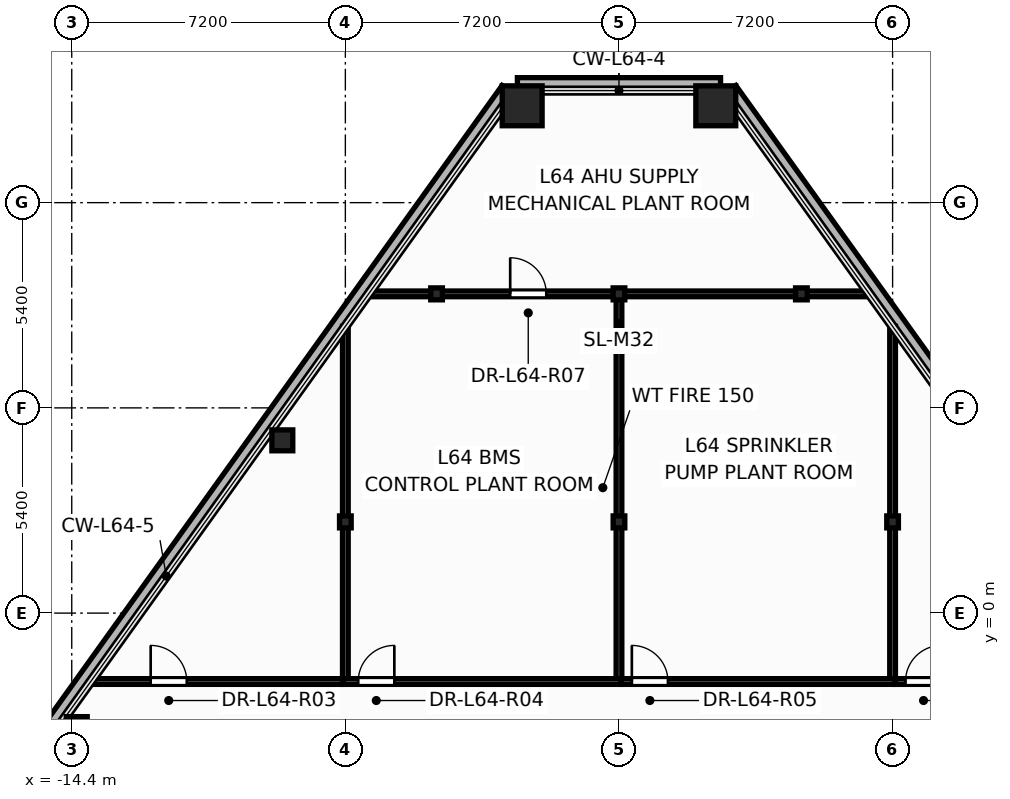
"""IFC4 building model, lengths in metres.
Left out: names, types, materials, properties, quantities, classifications, styles, units other than length and angle.
Written with IfcOpenShell. Run it as: python <this file> out.ifc"""

import sys

from ifc_helpers import new_model, si_unit, direction, frame, frame_2d, origin, origin_2d, place, context, subcontext, project, spatial, rectangle, hollow_rectangle, hollow_circle, i_section, extrude, element, fill, save


model = new_model("IFC4")
c1 = context("Model", 3, precision=1e-05, world=origin(), true_north=direction((0.0, 1.0)))
c2 = subcontext(c1, "Body", "Model", "MODEL_VIEW")
j1 = project(units=[si_unit("LENGTHUNIT", "METRE"), si_unit("PLANEANGLEUNIT", "RADIAN")], contexts=[c1])
p1 = place(None, origin())
s1 = spatial("IfcSite", under=j1, at=p1, CompositionType="ELEMENT")
p2 = place(p1, origin())
s2 = spatial("IfcBuilding", under=s1, at=p2, CompositionType="ELEMENT")
p3 = place(p2, frame((0.0, 0.0, 244.2)))
s3 = spatial("IfcBuildingStorey", under=s2, at=p3, CompositionType="ELEMENT", Elevation=244.2)
for number, where, z_axis, x_axis in (
    (1, (2.548, 13.349, 0.0), (0.0, 0.0, 1.0), (1.0, 0.0, 0.0)),
    (2, (-2.548, 13.349, 0.0), (0.0, 0.0, 1.0), (1.0, 0.0, 0.0)),
):
    element("IfcColumn", number, at=place(p3, frame(where, z_axis=z_axis, x_axis=x_axis)), inside=s3, PredefinedType="COLUMN", context=c2, shape_type="SweptSolid", body=[
        extrude(hollow_rectangle(XDim=1.05, YDim=1.05, WallThickness=0.045, at=origin_2d()), origin(), (0.0, 0.0, 1.0), 4.8),
    ])
for number, where, z_axis, x_axis in (
    (3, (-8.858, 4.546, 0.0), (0.0, 0.0, 1.0), (1.0, 0.0, 0.0)),
    (4, (-14.268, -2.999, 0.0), (0.0, 0.0, 1.0), (1.0, 0.0, 0.0)),
):
    element("IfcColumn", number, at=place(p3, frame(where, z_axis=z_axis, x_axis=x_axis)), inside=s3, PredefinedType="COLUMN", context=c2, shape_type="SweptSolid", body=[
        extrude(hollow_circle(Radius=0.275, WallThickness=0.024, at=origin_2d()), origin(), (0.0, 0.0, 1.0), 4.8),
    ])
for number, where, z_axis, x_axis in (
    (5, (-7.2, 2.4, 0.0), (0.0, 0.0, 1.0), (1.0, 0.0, 0.0)),
    (6, (0.0, 2.4, 0.0), (0.0, 0.0, 1.0), (1.0, 0.0, 0.0)),
    (7, (7.2, 2.4, 0.0), (0.0, 0.0, 1.0), (1.0, 0.0, 0.0)),
    (8, (-4.8, 8.4, 0.0), (0.0, 0.0, 1.0), (1.0, 0.0, 0.0)),
    (9, (0.0, 8.4, 0.0), (0.0, 0.0, 1.0), (1.0, 0.0, 0.0)),
    (10, (4.8, 8.4, 0.0), (0.0, 0.0, 1.0), (1.0, 0.0, 0.0)),
):
    element("IfcColumn", number, at=place(p3, frame(where, z_axis=z_axis, x_axis=x_axis)), inside=s3, PredefinedType="COLUMN", context=c2, shape_type="SweptSolid", body=[
        extrude(i_section(OverallWidth=0.307, OverallDepth=0.314, WebThickness=0.012, FlangeThickness=0.019, at=origin_2d()), origin(), (0.0, 0.0, 1.0), 4.8),
    ])
p4 = place(p3, frame((21.155, -11.644, -0.2), z_axis=(0.0, 0.0, 1.0), x_axis=(-0.582665985036, 0.812711726187, 0.0)))
e11 = element("IfcWall", 11, at=p4, inside=s3, PredefinedType="PARAPET", context=c2, shape_type="SweptSolid", body=[
    extrude(rectangle(XDim=31.279, YDim=0.36, at=frame_2d((15.639, 0.0))), origin(), (0.0, 0.0, 1.0), 0.38),
])
p5 = place(p3, frame((2.673, 13.909, -0.2), z_axis=(0.0, 0.0, 1.0), x_axis=(-1.0, 0.0, 0.0)))
e12 = element("IfcWall", 12, at=p5, inside=s3, PredefinedType="PARAPET", context=c2, shape_type="SweptSolid", body=[
    extrude(rectangle(XDim=5.346, YDim=0.36, at=frame_2d((2.673, 0.0))), origin(), (0.0, 0.0, 1.0), 0.38),
])
p6 = place(p3, frame((-2.929, 13.777, -0.2), z_axis=(0.0, 0.0, 1.0), x_axis=(-0.582665985036, -0.812711726187, 0.0)))
e13 = element("IfcWall", 13, at=p6, inside=s3, PredefinedType="PARAPET", context=c2, shape_type="SweptSolid", body=[
    extrude(rectangle(XDim=31.279, YDim=0.36, at=frame_2d((15.639, 0.0))), origin(), (0.0, 0.0, 1.0), 0.38),
])
p7 = place(p3, frame((0.0, -1.8, 0.0), z_axis=(0.0, 0.0, 1.0), x_axis=(0.0, 1.0, 0.0)))
e14 = element("IfcWall", 14, at=p7, inside=s3, PredefinedType="PARTITIONING", context=c2, shape_type="SweptSolid", body=[
    extrude(rectangle(XDim=10.2, YDim=0.15, at=frame_2d((5.1, 0.0))), origin(), (0.0, 0.0, 1.0), 3.52),
])
for number, where, z_axis, x_axis in (
    (15, (-7.2, -1.8, 0.0), (0.0, 0.0, 1.0), (0.0, 1.0, 0.0)),
    (16, (7.2, -1.8, 0.0), (0.0, 0.0, 1.0), (0.0, 1.0, 0.0)),
):
    element("IfcWall", number, at=place(p3, frame(where, z_axis=z_axis, x_axis=x_axis)), inside=s3, PredefinedType="PARTITIONING", context=c2, shape_type="SweptSolid", body=[
        extrude(rectangle(XDim=9.346, YDim=0.15, at=frame_2d((4.673, 0.0))), origin(), (0.0, 0.0, 1.0), 2.485),
    ])
p8 = place(p3, frame((-7.26, -1.8, 0.0), z_axis=(0.0, 0.0, 1.0), x_axis=(1.0, 0.0, 0.0)))
e17 = element("IfcWall", 17, at=p8, inside=s3, PredefinedType="PARTITIONING", context=c2, shape_type="SweptSolid", body=[
    extrude(rectangle(XDim=7.32, YDim=0.15, at=frame_2d((3.66, 0.0))), origin(), (0.0, 0.0, 1.0), 2.485),
])
p9 = place(p8, frame((0.399, 0.0, 0.0)))
e18 = element("IfcOpeningElement", 18, at=p9, cuts=e17, PredefinedType="OPENING", context=c2, shape_type="SweptSolid", body=[
    extrude(rectangle(XDim=0.956, YDim=2.104, at=frame_2d((0.475, 1.052))), frame((0.0, 0.085, 0.0), z_axis=(0.0, -1.0, 0.0), x_axis=(1.0, 0.0, 0.0)), (0.0, 0.0, 1.0), 0.17),
])
p10 = place(p3, frame((0.062, -1.8, 0.0), z_axis=(0.0, 0.0, 1.0), x_axis=(1.0, 0.0, 0.0)))
e19 = element("IfcWall", 19, at=p10, inside=s3, PredefinedType="PARTITIONING", context=c2, shape_type="SweptSolid", body=[
    extrude(rectangle(XDim=7.198, YDim=0.15, at=frame_2d((3.599, 0.0))), origin(), (0.0, 0.0, 1.0), 2.485),
])
p11 = place(p10, frame((0.277, 0.0, 0.0)))
e20 = element("IfcOpeningElement", 20, at=p11, cuts=e19, PredefinedType="OPENING", context=c2, shape_type="SweptSolid", body=[
    extrude(rectangle(XDim=0.956, YDim=2.104, at=frame_2d((0.475, 1.052))), frame((0.0, 0.085, 0.0), z_axis=(0.0, -1.0, 0.0), x_axis=(1.0, 0.0, 0.0)), (0.0, 0.0, 1.0), 0.17),
])
p12 = place(p3, frame((-13.9, -1.8, 0.0), z_axis=(0.0, 0.0, 1.0), x_axis=(1.0, 0.0, 0.0)))
e21 = element("IfcWall", 21, at=p12, inside=s3, PredefinedType="PARTITIONING", context=c2, shape_type="SweptSolid", body=[
    extrude(rectangle(XDim=6.638, YDim=0.15, at=frame_2d((3.319, 0.0))), origin(), (0.0, 0.0, 1.0), 2.485),
])
p13 = place(p12, frame((1.577, 0.0, 0.0)))
e22 = element("IfcOpeningElement", 22, at=p13, cuts=e21, PredefinedType="OPENING", context=c2, shape_type="SweptSolid", body=[
    extrude(rectangle(XDim=0.956, YDim=2.104, at=frame_2d((0.475, 1.052))), frame((0.0, 0.085, 0.0), z_axis=(0.0, -1.0, 0.0), x_axis=(1.0, 0.0, 0.0)), (0.0, 0.0, 1.0), 0.17),
])
p14 = place(p3, frame((7.262, -1.8, 0.0), z_axis=(0.0, 0.0, 1.0), x_axis=(1.0, 0.0, 0.0)))
e23 = element("IfcWall", 23, at=p14, inside=s3, PredefinedType="PARTITIONING", context=c2, shape_type="SweptSolid", body=[
    extrude(rectangle(XDim=6.638, YDim=0.15, at=frame_2d((3.319, 0.0))), origin(), (0.0, 0.0, 1.0), 2.485),
])
p15 = place(p14, frame((0.278, 0.0, 0.0)))
e24 = element("IfcOpeningElement", 24, at=p15, cuts=e23, PredefinedType="OPENING", context=c2, shape_type="SweptSolid", body=[
    extrude(rectangle(XDim=0.956, YDim=2.104, at=frame_2d((0.475, 1.052))), frame((0.0, 0.085, 0.0), z_axis=(0.0, -1.0, 0.0), x_axis=(1.0, 0.0, 0.0)), (0.0, 0.0, 1.0), 0.17),
])
p16 = place(p3, frame((-6.587, 8.4, 0.0), z_axis=(0.0, 0.0, 1.0), x_axis=(1.0, 0.0, 0.0)))
e25 = element("IfcWall", 25, at=p16, inside=s3, PredefinedType="PARTITIONING", context=c2, shape_type="SweptSolid", body=[
    extrude(rectangle(XDim=6.587, YDim=0.15, at=frame_2d((3.294, 0.0))), origin(), (0.0, 0.0, 1.0), 2.485),
])
p17 = place(p16, frame((3.725, 0.0, 0.0)))
e26 = element("IfcOpeningElement", 26, at=p17, cuts=e25, PredefinedType="OPENING", context=c2, shape_type="SweptSolid", body=[
    extrude(rectangle(XDim=0.956, YDim=2.104, at=frame_2d((0.475, 1.052))), frame((0.0, 0.085, 0.0), z_axis=(0.0, -1.0, 0.0), x_axis=(1.0, 0.0, 0.0)), (0.0, 0.0, 1.0), 0.17),
])
p18 = place(p3, frame((0.0, 8.4, 0.0), z_axis=(0.0, 0.0, 1.0), x_axis=(1.0, 0.0, 0.0)))
e27 = element("IfcWall", 27, at=p18, inside=s3, PredefinedType="PARTITIONING", context=c2, shape_type="SweptSolid", body=[
    extrude(rectangle(XDim=6.587, YDim=0.15, at=frame_2d((3.294, 0.0))), origin(), (0.0, 0.0, 1.0), 2.485),
])
p19 = place(p13, origin())
e28 = element("IfcDoor", 28, at=p19, inside=s3, OperationType="SINGLE_SWING_LEFT", PredefinedType="DOOR", context=c2, shape_type="SweptSolid", body=[
    extrude(rectangle(XDim=0.95, YDim=2.1, at=frame_2d((0.475, 1.05))), frame((0.0, 0.025, 0.0), z_axis=(0.0, -1.0, 0.0), x_axis=(1.0, 0.0, 0.0)), (0.0, 0.0, 1.0), 0.05),
])
fill(e22, e28)
p20 = place(p9, origin())
e29 = element("IfcDoor", 29, at=p20, inside=s3, OperationType="SINGLE_SWING_RIGHT", PredefinedType="DOOR", context=c2, shape_type="SweptSolid", body=[
    extrude(rectangle(XDim=0.95, YDim=2.1, at=frame_2d((0.475, 1.05))), frame((0.0, 0.025, 0.0), z_axis=(0.0, -1.0, 0.0), x_axis=(1.0, 0.0, 0.0)), (0.0, 0.0, 1.0), 0.05),
])
fill(e18, e29)
p21 = place(p11, origin())
e30 = element("IfcDoor", 30, at=p21, inside=s3, OperationType="SINGLE_SWING_LEFT", PredefinedType="DOOR", context=c2, shape_type="SweptSolid", body=[
    extrude(rectangle(XDim=0.95, YDim=2.1, at=frame_2d((0.475, 1.05))), frame((0.0, 0.025, 0.0), z_axis=(0.0, -1.0, 0.0), x_axis=(1.0, 0.0, 0.0)), (0.0, 0.0, 1.0), 0.05),
])
fill(e20, e30)
p22 = place(p15, origin())
e31 = element("IfcDoor", 31, at=p22, inside=s3, OperationType="SINGLE_SWING_RIGHT", PredefinedType="DOOR", context=c2, shape_type="SweptSolid", body=[
    extrude(rectangle(XDim=0.95, YDim=2.1, at=frame_2d((0.475, 1.05))), frame((0.0, 0.025, 0.0), z_axis=(0.0, -1.0, 0.0), x_axis=(1.0, 0.0, 0.0)), (0.0, 0.0, 1.0), 0.05),
])
fill(e24, e31)
p23 = place(p17, origin())
e32 = element("IfcDoor", 32, at=p23, inside=s3, OperationType="SINGLE_SWING_LEFT", PredefinedType="DOOR", context=c2, shape_type="SweptSolid", body=[
    extrude(rectangle(XDim=0.95, YDim=2.1, at=frame_2d((0.475, 1.05))), frame((0.0, 0.025, 0.0), z_axis=(0.0, -1.0, 0.0), x_axis=(1.0, 0.0, 0.0)), (0.0, 0.0, 1.0), 0.05),
])
fill(e26, e32)
save(model, sys.argv[1])
